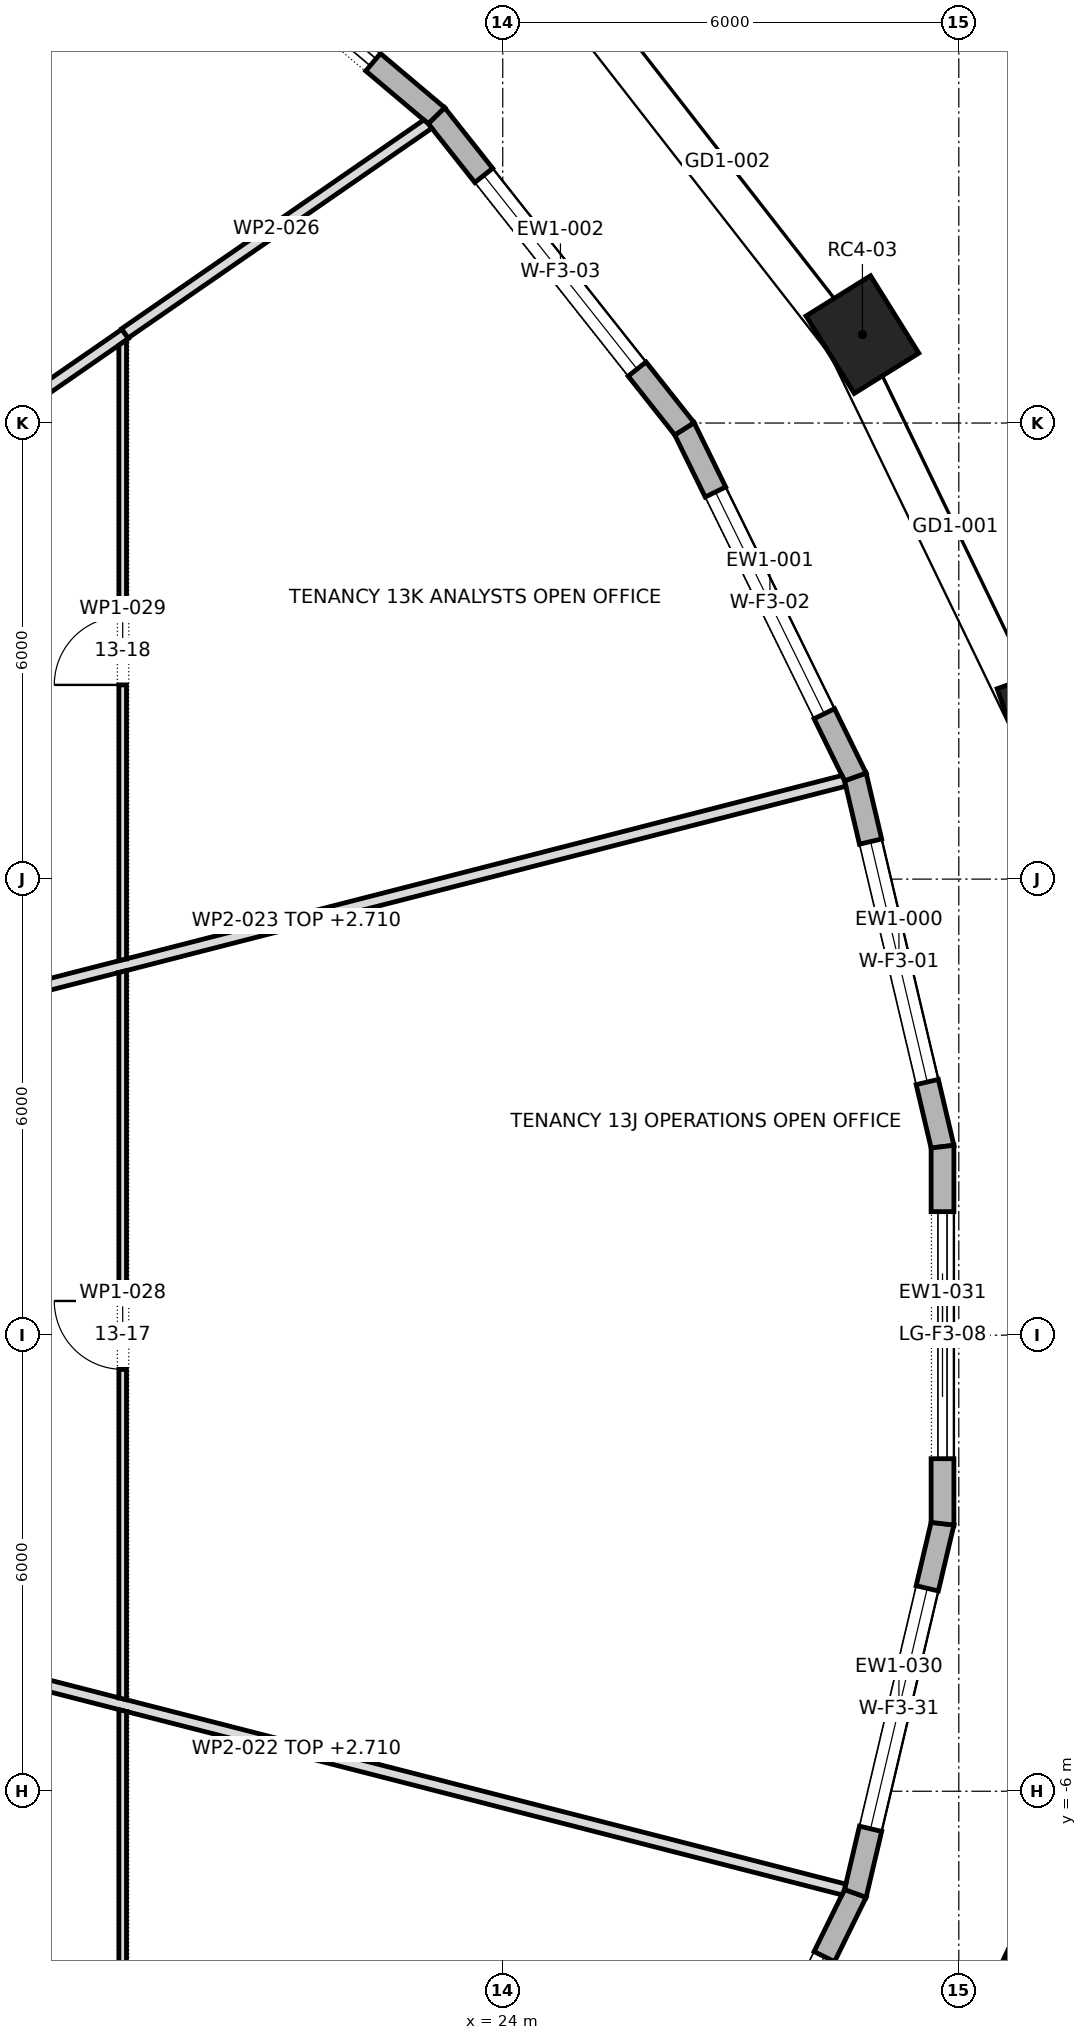
"""IFC4 building model, lengths in metres.
Left out: names, types, materials, properties, quantities, classifications, styles, units other than length and angle.
Written with IfcOpenShell. Run it as: python <this file> out.ifc"""

import sys

from ifc_helpers import new_model, si_unit, direction, frame, frame_2d, origin, origin_2d, place, context, subcontext, project, spatial, polyline, rectangle, outline, extrude, element, fill, save


model = new_model("IFC4")
c1 = context("Model", 3, precision=1e-05, world=origin(), true_north=direction((0.0, 1.0)))
c2 = subcontext(c1, "Body", "Model", "MODEL_VIEW")
j1 = project(units=[si_unit("LENGTHUNIT", "METRE"), si_unit("PLANEANGLEUNIT", "RADIAN")], contexts=[c1])
p1 = place(None, origin())
s1 = spatial("IfcSite", under=j1, at=p1, CompositionType="ELEMENT")
p2 = place(p1, origin())
s2 = spatial("IfcBuilding", under=s1, at=p2, CompositionType="ELEMENT")
p3 = place(p2, frame((0.0, 0.0, 190.9)))
s3 = spatial("IfcBuildingStorey", under=s2, at=p3, CompositionType="ELEMENT", Elevation=190.9)
for number, where, z_axis, x_axis in (
    (1, (31.176, 8.106, 0.0), (0.0, 0.0, 1.0), (-0.334, 0.943, 0.0)),
    (2, (28.732, 13.164, 0.0), (0.0, 0.0, 1.0), (-0.529, 0.849, 0.0)),
    (3, (31.176, -8.106, 0.0), (0.0, 0.0, 1.0), (0.334, 0.943, 0.0)),
):
    element("IfcColumn", number, at=place(p3, frame(where, z_axis=z_axis, x_axis=x_axis)), inside=s3, PredefinedType="COLUMN", context=c2, shape_type="SweptSolid", body=[
        extrude(rectangle(XDim=1.2, YDim=1.0, at=origin_2d()), origin(), (0.0, 0.0, 1.0), 4.0),
    ])
p4 = place(p3, frame((29.785, 2.48, 0.0), z_axis=(0.0, 0.0, 1.0), x_axis=(-0.229455912692, 0.97331905567, 0.0)))
e4 = element("IfcWall", 4, at=p4, inside=s3, PredefinedType="STANDARD", context=c2, shape_type="SweptSolid", body=[
    extrude(outline(polyline([(-0.017, -0.15), (5.014, -0.15), (4.981, 0.15), (0.017, 0.15), (-0.017, -0.15)])), origin(), (0.0, 0.0, 1.0), 3.7),
])
p5 = place(p4, frame((0.874, 0.0, 0.6)))
e5 = element("IfcOpeningElement", 5, at=p5, cuts=e4, PredefinedType="OPENING", context=c2, shape_type="SweptSolid", body=[
    extrude(rectangle(XDim=3.25, YDim=2.65, at=frame_2d((1.625, 1.325))), frame((0.0, 0.162, 0.0), z_axis=(0.0, -1.0, 0.0), x_axis=(1.0, 0.0, 0.0)), (0.0, 0.0, 1.0), 0.324),
])
p6 = place(p3, frame((28.639, 7.344, 0.0), z_axis=(0.0, 0.0, 1.0), x_axis=(-0.440694221881, 0.897657285829, 0.0)))
e6 = element("IfcWall", 6, at=p6, inside=s3, PredefinedType="STANDARD", context=c2, shape_type="SweptSolid", body=[
    extrude(outline(polyline([(-0.017, -0.15), (5.118, -0.15), (5.086, 0.15), (0.017, 0.15), (-0.017, -0.15)])), origin(), (0.0, 0.0, 1.0), 3.7),
])
p7 = place(p6, frame((0.926, 0.0, 0.6)))
e7 = element("IfcOpeningElement", 7, at=p7, cuts=e6, PredefinedType="OPENING", context=c2, shape_type="SweptSolid", body=[
    extrude(rectangle(XDim=3.25, YDim=2.65, at=frame_2d((1.625, 1.325))), frame((0.0, 0.162, 0.0), z_axis=(0.0, -1.0, 0.0), x_axis=(1.0, 0.0, 0.0)), (0.0, 0.0, 1.0), 0.324),
])
p8 = place(p3, frame((26.39, 11.924, 0.0), z_axis=(0.0, 0.0, 1.0), x_axis=(-0.620829074232, 0.783945955145, 0.0)))
e8 = element("IfcWall", 8, at=p8, inside=s3, PredefinedType="STANDARD", context=c2, shape_type="SweptSolid", body=[
    extrude(outline(polyline([(-0.016, -0.15), (5.27, -0.15), (5.24, 0.15), (0.016, 0.15), (-0.016, -0.15)])), origin(), (0.0, 0.0, 1.0), 3.7),
])
p9 = place(p8, frame((1.003, 0.0, 0.6)))
e9 = element("IfcOpeningElement", 9, at=p9, cuts=e8, PredefinedType="OPENING", context=c2, shape_type="SweptSolid", body=[
    extrude(rectangle(XDim=3.25, YDim=2.65, at=frame_2d((1.625, 1.325))), frame((0.0, 0.162, 0.0), z_axis=(0.0, -1.0, 0.0), x_axis=(1.0, 0.0, 0.0)), (0.0, 0.0, 1.0), 0.324),
])
p10 = place(p3, frame((23.128, 16.044, 0.0), z_axis=(0.0, 0.0, 1.0), x_axis=(-0.764330261608, 0.644824977176, 0.0)))
e10 = element("IfcWall", 10, at=p10, inside=s3, PredefinedType="STANDARD", context=c2, shape_type="SweptSolid", body=[
    extrude(outline(polyline([(-0.015, -0.15), (5.444, -0.15), (5.416, 0.15), (0.015, 0.15), (-0.015, -0.15)])), origin(), (0.0, 0.0, 1.0), 3.7),
])
p11 = place(p10, frame((1.09, 0.0, 0.0)))
e11 = element("IfcOpeningElement", 11, at=p11, cuts=e10, PredefinedType="OPENING", context=c2, shape_type="SweptSolid", body=[
    extrude(rectangle(XDim=3.25, YDim=3.25, at=frame_2d((1.625, 1.625))), frame((0.0, 0.162, 0.0), z_axis=(0.0, -1.0, 0.0), x_axis=(1.0, 0.0, 0.0)), (0.0, 0.0, 1.0), 0.324),
])
p12 = place(p3, frame((26.39, -11.924, 0.0), z_axis=(0.0, 0.0, 1.0), x_axis=(0.440694221881, 0.897657285829, 0.0)))
e12 = element("IfcWall", 12, at=p12, inside=s3, PredefinedType="STANDARD", context=c2, shape_type="SweptSolid", body=[
    extrude(outline(polyline([(-0.016, -0.15), (5.119, -0.15), (5.085, 0.15), (0.016, 0.15), (-0.016, -0.15)])), origin(), (0.0, 0.0, 1.0), 3.7),
])
p13 = place(p12, frame((0.926, 0.0, 0.6)))
e13 = element("IfcOpeningElement", 13, at=p13, cuts=e12, PredefinedType="OPENING", context=c2, shape_type="SweptSolid", body=[
    extrude(rectangle(XDim=3.25, YDim=2.65, at=frame_2d((1.625, 1.325))), frame((0.0, 0.162, 0.0), z_axis=(0.0, -1.0, 0.0), x_axis=(1.0, 0.0, 0.0)), (0.0, 0.0, 1.0), 0.324),
])
p14 = place(p3, frame((28.639, -7.344, 0.0), z_axis=(0.0, 0.0, 1.0), x_axis=(0.229455912692, 0.97331905567, 0.0)))
e14 = element("IfcWall", 14, at=p14, inside=s3, PredefinedType="STANDARD", context=c2, shape_type="SweptSolid", body=[
    extrude(outline(polyline([(-0.017, -0.15), (5.015, -0.15), (4.98, 0.15), (0.017, 0.15), (-0.017, -0.15)])), origin(), (0.0, 0.0, 1.0), 3.7),
])
p15 = place(p14, frame((0.874, 0.0, 0.6)))
e15 = element("IfcOpeningElement", 15, at=p15, cuts=e14, PredefinedType="OPENING", context=c2, shape_type="SweptSolid", body=[
    extrude(rectangle(XDim=3.25, YDim=2.65, at=frame_2d((1.625, 1.325))), frame((0.0, 0.162, 0.0), z_axis=(0.0, -1.0, 0.0), x_axis=(1.0, 0.0, 0.0)), (0.0, 0.0, 1.0), 0.324),
])
p16 = place(p3, frame((29.785, -2.48, 0.0), z_axis=(0.0, 0.0, 1.0), x_axis=(0.0, 1.0, 0.0)))
e16 = element("IfcWall", 16, at=p16, inside=s3, PredefinedType="STANDARD", context=c2, shape_type="SweptSolid", body=[
    extrude(outline(polyline([(-0.017, -0.15), (4.977, -0.15), (4.943, 0.15), (0.017, 0.15), (-0.017, -0.15)])), origin(), (0.0, 0.0, 1.0), 3.7),
])
p17 = place(p16, frame((0.855, 0.0, 0.0)))
e17 = element("IfcOpeningElement", 17, at=p17, cuts=e16, PredefinedType="OPENING", context=c2, shape_type="SweptSolid", body=[
    extrude(rectangle(XDim=3.25, YDim=3.25, at=frame_2d((1.625, 1.625))), frame((0.0, 0.162, 0.0), z_axis=(0.0, -1.0, 0.0), x_axis=(1.0, 0.0, 0.0)), (0.0, 0.0, 1.0), 0.324),
])
p18 = place(p3, frame((13.598, 13.977, 0.0), z_axis=(0.0, 0.0, 1.0), x_axis=(0.696864554069, 0.717202756048, 0.0)))
e18 = element("IfcWall", 18, at=p18, inside=s3, PredefinedType="PARTITIONING", context=c2, shape_type="SweptSolid", body=[
    extrude(outline(polyline([(7.599, -0.075), (7.599, -0.074), (7.594, -0.003), (7.573, 0.075), (5.696, 0.075), (3.818, 0.075), (1.941, 0.075), (0.063, 0.075), (0.032, 0.0), (0.0, -0.075), (1.9, -0.075), (3.799, -0.075), (5.699, -0.075), (7.599, -0.075)])), origin(), (0.0, 0.0, 1.0), 3.7),
])
p19 = place(p3, frame((14.057, -3.594, 0.0), z_axis=(0.0, 0.0, 1.0), x_axis=(0.96870063855, -0.248231893342, 0.0)))
e19 = element("IfcWall", 19, at=p19, inside=s3, PredefinedType="PARTITIONING", context=c2, shape_type="SweptSolid", body=[
    extrude(outline(polyline([(0.038, -0.075), (1.748, -0.075), (3.458, -0.075), (5.168, -0.075), (5.174, -0.073), (5.174, -0.075), (7.117, -0.075), (9.061, -0.075), (11.004, -0.075), (12.947, -0.075), (14.89, -0.075), (14.904, -0.008), (14.904, 0.075), (12.931, 0.075), (10.958, 0.075), (8.985, 0.075), (7.011, 0.075), (5.038, 0.075), (5.033, 0.073), (5.032, 0.075), (3.355, 0.075), (1.677, 0.075), (0.0, 0.075), (0.0, 0.074), (0.038, -0.075)])), origin(), (0.0, 0.0, 1.0), 2.71),
])
p20 = place(p3, frame((14.057, 3.594, 0.0), z_axis=(0.0, 0.0, 1.0), x_axis=(0.96870063855, 0.248231893342, 0.0)))
e20 = element("IfcWall", 20, at=p20, inside=s3, PredefinedType="PARTITIONING", context=c2, shape_type="SweptSolid", body=[
    extrude(outline(polyline([(0.0, -0.075), (1.677, -0.075), (3.355, -0.075), (5.032, -0.075), (5.033, -0.073), (5.038, -0.075), (7.011, -0.075), (8.985, -0.075), (10.958, -0.075), (12.931, -0.075), (14.904, -0.075), (14.904, 0.008), (14.89, 0.075), (12.947, 0.075), (11.004, 0.075), (9.061, 0.075), (7.117, 0.075), (5.174, 0.075), (5.174, 0.073), (5.168, 0.075), (3.458, 0.075), (1.748, 0.075), (0.038, 0.075), (0.0, -0.074), (0.0, -0.075)])), origin(), (0.0, 0.0, 1.0), 2.71),
])
p21 = place(p3, frame((13.968, 9.667, 0.0), z_axis=(0.0, 0.0, 1.0), x_axis=(0.822290630684, 0.569067762827, 0.0)))
e21 = element("IfcWall", 21, at=p21, inside=s3, PredefinedType="PARTITIONING", context=c2, shape_type="SweptSolid", body=[
    extrude(outline(polyline([(6.16, 0.075), (4.62, 0.075), (3.08, 0.075), (1.54, 0.075), (0.0, 0.075), (0.079, -0.075), (1.599, -0.075), (3.119, -0.075), (4.64, -0.075), (6.16, -0.075), (6.16, 0.075)])), origin(), (0.0, 0.0, 1.0), 2.947),
])
p22 = place(p3, frame((19.028, 13.179, 0.0), z_axis=(0.0, 0.0, 1.0), x_axis=(0.822732902653, 0.568428158074, 0.0)))
e22 = element("IfcWall", 22, at=p22, inside=s3, PredefinedType="PARTITIONING", context=c2, shape_type="SweptSolid", body=[
    extrude(outline(polyline([(4.857, -0.075), (4.857, -0.068), (4.852, 0.002), (4.832, 0.075), (3.221, 0.075), (1.611, 0.075), (0.0, 0.075), (0.0, -0.04), (0.0, -0.075), (1.619, -0.075), (3.238, -0.075), (4.857, -0.075)])), origin(), (0.0, 0.0, 1.0), 3.7),
])
p23 = place(p3, frame((19.0, -4.926, 0.0), z_axis=(0.0, 0.0, 1.0), x_axis=(0.0, -1.0, 0.0)))
e23 = element("IfcWall", 23, at=p23, inside=s3, PredefinedType="PARTITIONING", context=c2, shape_type="SweptSolid", body=[
    extrude(outline(polyline([(0.0, -0.05), (1.62, -0.05), (3.24, -0.05), (4.86, -0.05), (6.481, -0.05), (8.101, -0.05), (8.169, 0.049), (8.169, 0.05), (6.541, 0.05), (4.912, 0.05), (3.283, 0.05), (1.654, 0.05), (0.025, 0.05), (0.0, -0.049), (0.0, -0.05)])), origin(), (0.0, 0.0, 1.0), 3.7),
])
p24 = place(p23, frame((3.629, 0.0, 0.0)))
e24 = element("IfcOpeningElement", 24, at=p24, cuts=e23, PredefinedType="OPENING", context=c2, shape_type="SweptSolid", body=[
    extrude(rectangle(XDim=0.9, YDim=2.1, at=frame_2d((0.45, 1.05))), frame((0.0, 0.062, 0.0), z_axis=(0.0, -1.0, 0.0), x_axis=(1.0, 0.0, 0.0)), (0.0, 0.0, 1.0), 0.124),
])
p25 = place(p3, frame((19.0, 4.796, 0.0), z_axis=(0.0, 0.0, 1.0), x_axis=(0.0, -1.0, 0.0)))
e25 = element("IfcWall", 25, at=p25, inside=s3, PredefinedType="PARTITIONING", context=c2, shape_type="SweptSolid", body=[
    extrude(outline(polyline([(0.025, -0.05), (1.934, -0.05), (3.842, -0.05), (5.75, -0.05), (7.659, -0.05), (9.567, -0.05), (9.593, 0.049), (9.593, 0.05), (7.674, 0.05), (5.756, 0.05), (3.837, 0.05), (1.918, 0.05), (0.0, 0.05), (0.0, 0.049), (0.025, -0.05)])), origin(), (0.0, 0.0, 1.0), 3.7),
])
p26 = place(p25, frame((4.346, 0.0, 0.0)))
e26 = element("IfcOpeningElement", 26, at=p26, cuts=e25, PredefinedType="OPENING", context=c2, shape_type="SweptSolid", body=[
    extrude(rectangle(XDim=0.9, YDim=2.1, at=frame_2d((0.45, 1.05))), frame((0.0, 0.062, 0.0), z_axis=(0.0, -1.0, 0.0), x_axis=(1.0, 0.0, 0.0)), (0.0, 0.0, 1.0), 0.124),
])
p27 = place(p3, frame((19.0, 13.093, 0.0), z_axis=(0.0, 0.0, 1.0), x_axis=(0.0, -1.0, 0.0)))
e27 = element("IfcWall", 27, at=p27, inside=s3, PredefinedType="PARTITIONING", context=c2, shape_type="SweptSolid", body=[
    extrude(outline(polyline([(8.167, -0.05), (8.167, -0.049), (8.142, 0.05), (6.513, 0.05), (4.885, 0.05), (3.257, 0.05), (1.628, 0.05), (0.0, 0.05), (0.0, 0.05), (0.069, -0.05), (1.688, -0.05), (3.308, -0.05), (4.928, -0.05), (6.547, -0.05), (8.167, -0.05)])), origin(), (0.0, 0.0, 1.0), 3.7),
])
p28 = place(p27, frame((3.638, 0.0, 0.0)))
e28 = element("IfcOpeningElement", 28, at=p28, cuts=e27, PredefinedType="OPENING", context=c2, shape_type="SweptSolid", body=[
    extrude(rectangle(XDim=0.9, YDim=2.1, at=frame_2d((0.45, 1.05))), frame((0.0, 0.062, 0.0), z_axis=(0.0, -1.0, 0.0), x_axis=(1.0, 0.0, 0.0)), (0.0, 0.0, 1.0), 0.124),
])
p29 = place(p5, origin())
e29 = element("IfcWindow", 29, at=p29, inside=s3, PartitioningType="TRIPLE_PANEL_VERTICAL", PredefinedType="WINDOW", context=c2, shape_type="SweptSolid", body=[
    extrude(rectangle(XDim=3.25, YDim=2.65, at=frame_2d((1.625, 1.325))), frame((0.0, 0.03, 0.0), z_axis=(0.0, -1.0, 0.0), x_axis=(1.0, 0.0, 0.0)), (0.0, 0.0, 1.0), 0.06),
])
fill(e5, e29)
p30 = place(p7, origin())
e30 = element("IfcWindow", 30, at=p30, inside=s3, PartitioningType="TRIPLE_PANEL_VERTICAL", PredefinedType="WINDOW", context=c2, shape_type="SweptSolid", body=[
    extrude(rectangle(XDim=3.25, YDim=2.65, at=frame_2d((1.625, 1.325))), frame((0.0, 0.03, 0.0), z_axis=(0.0, -1.0, 0.0), x_axis=(1.0, 0.0, 0.0)), (0.0, 0.0, 1.0), 0.06),
])
fill(e7, e30)
p31 = place(p9, origin())
e31 = element("IfcWindow", 31, at=p31, inside=s3, PartitioningType="TRIPLE_PANEL_VERTICAL", PredefinedType="WINDOW", context=c2, shape_type="SweptSolid", body=[
    extrude(rectangle(XDim=3.25, YDim=2.65, at=frame_2d((1.625, 1.325))), frame((0.0, 0.03, 0.0), z_axis=(0.0, -1.0, 0.0), x_axis=(1.0, 0.0, 0.0)), (0.0, 0.0, 1.0), 0.06),
])
fill(e9, e31)
p32 = place(p11, origin())
e32 = element("IfcDoor", 32, at=p32, inside=s3, OperationType="DOUBLE_DOOR_SLIDING", PredefinedType="DOOR", context=c2, shape_type="SweptSolid", body=[
    extrude(rectangle(XDim=3.25, YDim=3.25, at=frame_2d((1.625, 1.625))), frame((0.0, 0.025, 0.0), z_axis=(0.0, -1.0, 0.0), x_axis=(1.0, 0.0, 0.0)), (0.0, 0.0, 1.0), 0.05),
])
fill(e11, e32)
p33 = place(p13, origin())
e33 = element("IfcWindow", 33, at=p33, inside=s3, PartitioningType="TRIPLE_PANEL_VERTICAL", PredefinedType="WINDOW", context=c2, shape_type="SweptSolid", body=[
    extrude(rectangle(XDim=3.25, YDim=2.65, at=frame_2d((1.625, 1.325))), frame((0.0, 0.03, 0.0), z_axis=(0.0, -1.0, 0.0), x_axis=(1.0, 0.0, 0.0)), (0.0, 0.0, 1.0), 0.06),
])
fill(e13, e33)
p34 = place(p15, origin())
e34 = element("IfcWindow", 34, at=p34, inside=s3, PartitioningType="TRIPLE_PANEL_VERTICAL", PredefinedType="WINDOW", context=c2, shape_type="SweptSolid", body=[
    extrude(rectangle(XDim=3.25, YDim=2.65, at=frame_2d((1.625, 1.325))), frame((0.0, 0.03, 0.0), z_axis=(0.0, -1.0, 0.0), x_axis=(1.0, 0.0, 0.0)), (0.0, 0.0, 1.0), 0.06),
])
fill(e15, e34)
p35 = place(p17, origin())
e35 = element("IfcDoor", 35, at=p35, inside=s3, OperationType="DOUBLE_DOOR_SLIDING", PredefinedType="DOOR", context=c2, shape_type="SweptSolid", body=[
    extrude(rectangle(XDim=3.25, YDim=3.25, at=frame_2d((1.625, 1.625))), frame((0.0, 0.025, 0.0), z_axis=(0.0, -1.0, 0.0), x_axis=(1.0, 0.0, 0.0)), (0.0, 0.0, 1.0), 0.05),
])
fill(e17, e35)
p36 = place(p26, frame((0.9, 0.0, 0.0), z_axis=(0.0, 0.0, 1.0), x_axis=(-1.0, 0.0, 0.0)))
e36 = element("IfcDoor", 36, at=p36, inside=s3, OperationType="SINGLE_SWING_LEFT", PredefinedType="DOOR", context=c2, shape_type="SweptSolid", body=[
    extrude(rectangle(XDim=0.9, YDim=2.1, at=frame_2d((0.45, 1.05))), frame((0.0, 0.025, 0.0), z_axis=(0.0, -1.0, 0.0), x_axis=(1.0, 0.0, 0.0)), (0.0, 0.0, 1.0), 0.05),
])
fill(e26, e36)
p37 = place(p28, frame((0.9, 0.0, 0.0), z_axis=(0.0, 0.0, 1.0), x_axis=(-1.0, 0.0, 0.0)))
e37 = element("IfcDoor", 37, at=p37, inside=s3, OperationType="SINGLE_SWING_RIGHT", PredefinedType="DOOR", context=c2, shape_type="SweptSolid", body=[
    extrude(rectangle(XDim=0.9, YDim=2.1, at=frame_2d((0.45, 1.05))), frame((0.0, 0.025, 0.0), z_axis=(0.0, -1.0, 0.0), x_axis=(1.0, 0.0, 0.0)), (0.0, 0.0, 1.0), 0.05),
])
fill(e28, e37)
save(model, sys.argv[1])
